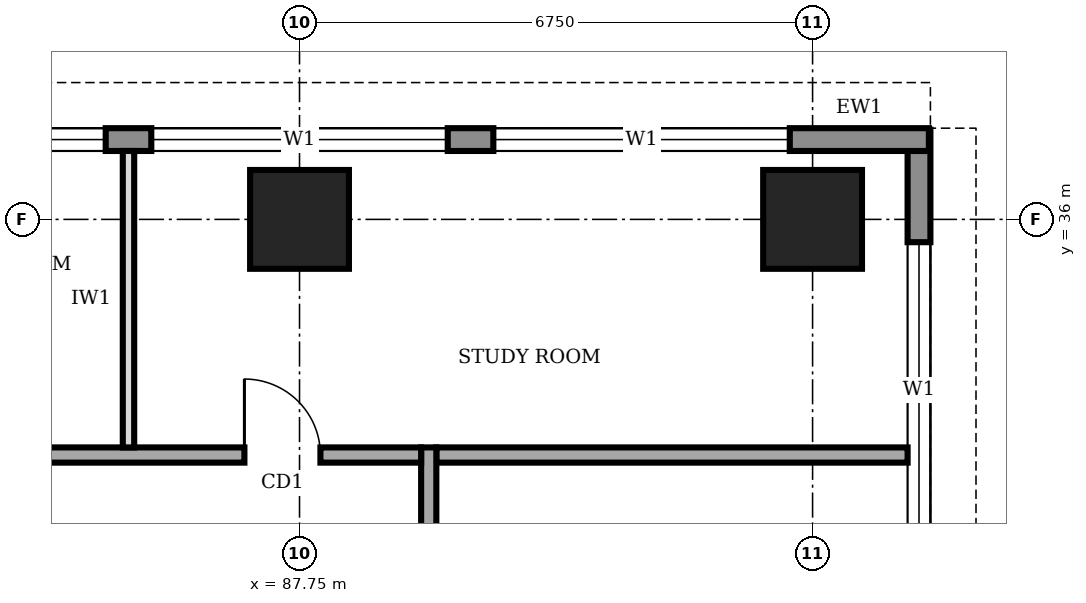
"""IFC4 building model, lengths in metres.
Left out: names, types, materials, properties, quantities, classifications, styles, units other than length and angle.
Written with IfcOpenShell. Run it as: python <this file> out.ifc"""

import sys

from ifc_helpers import new_model, si_unit, direction, frame, frame_2d, origin, origin_2d, place, context, subcontext, project, spatial, rectangle, extrude, element, fill, save


model = new_model("IFC4")
c1 = context("Model", 3, precision=1e-05, world=origin(), true_north=direction((0.0, 1.0)))
c2 = subcontext(c1, "Body", "Model", "MODEL_VIEW")
j1 = project(units=[si_unit("LENGTHUNIT", "METRE"), si_unit("PLANEANGLEUNIT", "RADIAN")], contexts=[c1])
p1 = place(None, origin())
s1 = spatial("IfcSite", under=j1, at=p1, CompositionType="ELEMENT")
p2 = place(p1, origin())
s2 = spatial("IfcBuilding", under=s1, at=p2, CompositionType="ELEMENT")
p3 = place(p2, frame((0.0, 0.0, 217.0)))
s3 = spatial("IfcBuildingStorey", under=s2, at=p3, CompositionType="ELEMENT", Elevation=217.0)
for number, where, z_axis, x_axis in (
    (1, (87.75, 36.0, 0.0), (0.0, 0.0, 1.0), (1.0, 0.0, 0.0)),
    (2, (94.5, 36.0, 0.0), (0.0, 0.0, 1.0), (1.0, 0.0, 0.0)),
):
    element("IfcColumn", number, at=place(p3, frame(where, z_axis=z_axis, x_axis=x_axis)), inside=s3, PredefinedType="COLUMN", context=c2, shape_type="SweptSolid", body=[
        extrude(rectangle(XDim=1.3, YDim=1.3, at=origin_2d()), origin(), (0.0, 0.0, 1.0), 4.0),
    ])
p4 = place(p3, frame((95.9, 3.32, 0.0), z_axis=(0.0, 0.0, 1.0), x_axis=(0.0, 1.0, 0.0)))
e3 = element("IfcWall", 3, at=p4, inside=s3, PredefinedType="STANDARD", context=c2, shape_type="SweptSolid", body=[
    extrude(rectangle(XDim=33.86, YDim=0.3, at=frame_2d((16.93, 0.0))), origin(), (0.0, 0.0, 1.0), 3.75),
])
p5 = place(p4, frame((1.48, 0.0, 0.9)))
e4 = element("IfcOpeningElement", 4, at=p5, cuts=e3, PredefinedType="OPENING", context=c2, shape_type="SweptSolid", body=[
    extrude(rectangle(XDim=3.9, YDim=2.2, at=frame_2d((1.95, 1.1))), frame((0.0, 0.16, 0.0), z_axis=(0.0, -1.0, 0.0), x_axis=(1.0, 0.0, 0.0)), (0.0, 0.0, 1.0), 0.32),
])
p6 = place(p4, frame((5.98, 0.0, 0.9)))
e5 = element("IfcOpeningElement", 5, at=p6, cuts=e3, PredefinedType="OPENING", context=c2, shape_type="SweptSolid", body=[
    extrude(rectangle(XDim=3.9, YDim=2.2, at=frame_2d((1.95, 1.1))), frame((0.0, 0.16, 0.0), z_axis=(0.0, -1.0, 0.0), x_axis=(1.0, 0.0, 0.0)), (0.0, 0.0, 1.0), 0.32),
])
p7 = place(p4, frame((10.48, 0.0, 0.9)))
e6 = element("IfcOpeningElement", 6, at=p7, cuts=e3, PredefinedType="OPENING", context=c2, shape_type="SweptSolid", body=[
    extrude(rectangle(XDim=3.9, YDim=2.2, at=frame_2d((1.95, 1.1))), frame((0.0, 0.16, 0.0), z_axis=(0.0, -1.0, 0.0), x_axis=(1.0, 0.0, 0.0)), (0.0, 0.0, 1.0), 0.32),
])
p8 = place(p4, frame((14.98, 0.0, 0.9)))
e7 = element("IfcOpeningElement", 7, at=p8, cuts=e3, PredefinedType="OPENING", context=c2, shape_type="SweptSolid", body=[
    extrude(rectangle(XDim=3.9, YDim=2.2, at=frame_2d((1.95, 1.1))), frame((0.0, 0.16, 0.0), z_axis=(0.0, -1.0, 0.0), x_axis=(1.0, 0.0, 0.0)), (0.0, 0.0, 1.0), 0.32),
])
p9 = place(p4, frame((19.48, 0.0, 0.9)))
e8 = element("IfcOpeningElement", 8, at=p9, cuts=e3, PredefinedType="OPENING", context=c2, shape_type="SweptSolid", body=[
    extrude(rectangle(XDim=3.9, YDim=2.2, at=frame_2d((1.95, 1.1))), frame((0.0, 0.16, 0.0), z_axis=(0.0, -1.0, 0.0), x_axis=(1.0, 0.0, 0.0)), (0.0, 0.0, 1.0), 0.32),
])
p10 = place(p4, frame((23.98, 0.0, 0.9)))
e9 = element("IfcOpeningElement", 9, at=p10, cuts=e3, PredefinedType="OPENING", context=c2, shape_type="SweptSolid", body=[
    extrude(rectangle(XDim=3.9, YDim=2.2, at=frame_2d((1.95, 1.1))), frame((0.0, 0.16, 0.0), z_axis=(0.0, -1.0, 0.0), x_axis=(1.0, 0.0, 0.0)), (0.0, 0.0, 1.0), 0.32),
])
p11 = place(p4, frame((28.48, 0.0, 0.9)))
e10 = element("IfcOpeningElement", 10, at=p11, cuts=e3, PredefinedType="OPENING", context=c2, shape_type="SweptSolid", body=[
    extrude(rectangle(XDim=3.9, YDim=2.2, at=frame_2d((1.95, 1.1))), frame((0.0, 0.16, 0.0), z_axis=(0.0, -1.0, 0.0), x_axis=(1.0, 0.0, 0.0)), (0.0, 0.0, 1.0), 0.32),
])
p12 = place(p3, frame((96.03, 37.05, 0.0), z_axis=(0.0, 0.0, 1.0), x_axis=(-1.0, 0.0, 0.0)))
e11 = element("IfcWall", 11, at=p12, inside=s3, PredefinedType="STANDARD", context=c2, shape_type="SweptSolid", body=[
    extrude(rectangle(XDim=29.91, YDim=0.3, at=frame_2d((14.955, 0.0))), origin(), (0.0, 0.0, 1.0), 3.75),
])
p13 = place(p12, frame((24.33, 0.0, 0.9)))
e12 = element("IfcOpeningElement", 12, at=p13, cuts=e11, PredefinedType="OPENING", context=c2, shape_type="SweptSolid", body=[
    extrude(rectangle(XDim=3.9, YDim=2.2, at=frame_2d((1.95, 1.1))), frame((0.0, 0.16, 0.0), z_axis=(0.0, -1.0, 0.0), x_axis=(1.0, 0.0, 0.0)), (0.0, 0.0, 1.0), 0.32),
])
p14 = place(p12, frame((19.83, 0.0, 0.9)))
e13 = element("IfcOpeningElement", 13, at=p14, cuts=e11, PredefinedType="OPENING", context=c2, shape_type="SweptSolid", body=[
    extrude(rectangle(XDim=3.9, YDim=2.2, at=frame_2d((1.95, 1.1))), frame((0.0, 0.16, 0.0), z_axis=(0.0, -1.0, 0.0), x_axis=(1.0, 0.0, 0.0)), (0.0, 0.0, 1.0), 0.32),
])
p15 = place(p12, frame((15.33, 0.0, 0.9)))
e14 = element("IfcOpeningElement", 14, at=p15, cuts=e11, PredefinedType="OPENING", context=c2, shape_type="SweptSolid", body=[
    extrude(rectangle(XDim=3.9, YDim=2.2, at=frame_2d((1.95, 1.1))), frame((0.0, 0.16, 0.0), z_axis=(0.0, -1.0, 0.0), x_axis=(1.0, 0.0, 0.0)), (0.0, 0.0, 1.0), 0.32),
])
p16 = place(p12, frame((10.83, 0.0, 0.9)))
e15 = element("IfcOpeningElement", 15, at=p16, cuts=e11, PredefinedType="OPENING", context=c2, shape_type="SweptSolid", body=[
    extrude(rectangle(XDim=3.9, YDim=2.2, at=frame_2d((1.95, 1.1))), frame((0.0, 0.16, 0.0), z_axis=(0.0, -1.0, 0.0), x_axis=(1.0, 0.0, 0.0)), (0.0, 0.0, 1.0), 0.32),
])
p17 = place(p12, frame((6.33, 0.0, 0.9)))
e16 = element("IfcOpeningElement", 16, at=p17, cuts=e11, PredefinedType="OPENING", context=c2, shape_type="SweptSolid", body=[
    extrude(rectangle(XDim=3.9, YDim=2.2, at=frame_2d((1.95, 1.1))), frame((0.0, 0.16, 0.0), z_axis=(0.0, -1.0, 0.0), x_axis=(1.0, 0.0, 0.0)), (0.0, 0.0, 1.0), 0.32),
])
p18 = place(p12, frame((1.83, 0.0, 0.9)))
e17 = element("IfcOpeningElement", 17, at=p18, cuts=e11, PredefinedType="OPENING", context=c2, shape_type="SweptSolid", body=[
    extrude(rectangle(XDim=3.9, YDim=2.2, at=frame_2d((1.95, 1.1))), frame((0.0, 0.16, 0.0), z_axis=(0.0, -1.0, 0.0), x_axis=(1.0, 0.0, 0.0)), (0.0, 0.0, 1.0), 0.32),
])
p19 = place(p3, frame((89.45, 9.2, 0.0), z_axis=(0.0, 0.0, 1.0), x_axis=(0.0, 1.0, 0.0)))
e18 = element("IfcWall", 18, at=p19, inside=s3, PredefinedType="SOLIDWALL", context=c2, shape_type="SweptSolid", body=[
    extrude(rectangle(XDim=23.8, YDim=0.2, at=frame_2d((11.9, 0.0))), origin(), (0.0, 0.0, 1.0), 3.75),
])
p20 = place(p19, frame((1.55, 0.0, 0.0)))
e19 = element("IfcOpeningElement", 19, at=p20, cuts=e18, PredefinedType="OPENING", context=c2, shape_type="SweptSolid", body=[
    extrude(rectangle(XDim=1.0, YDim=2.1, at=frame_2d((0.5, 1.05))), frame((0.0, 0.11, 0.0), z_axis=(0.0, -1.0, 0.0), x_axis=(1.0, 0.0, 0.0)), (0.0, 0.0, 1.0), 0.22),
])
p21 = place(p19, frame((4.9, 0.0, 0.0)))
e20 = element("IfcOpeningElement", 20, at=p21, cuts=e18, PredefinedType="OPENING", context=c2, shape_type="SweptSolid", body=[
    extrude(rectangle(XDim=1.0, YDim=2.1, at=frame_2d((0.5, 1.05))), frame((0.0, 0.11, 0.0), z_axis=(0.0, -1.0, 0.0), x_axis=(1.0, 0.0, 0.0)), (0.0, 0.0, 1.0), 0.22),
])
p22 = place(p19, frame((8.0, 0.0, 0.0)))
e21 = element("IfcOpeningElement", 21, at=p22, cuts=e18, PredefinedType="OPENING", context=c2, shape_type="SweptSolid", body=[
    extrude(rectangle(XDim=0.9, YDim=2.1, at=frame_2d((0.45, 1.05))), frame((0.0, 0.11, 0.0), z_axis=(0.0, -1.0, 0.0), x_axis=(1.0, 0.0, 0.0)), (0.0, 0.0, 1.0), 0.22),
])
p23 = place(p19, frame((11.05, 0.0, 0.0)))
e22 = element("IfcOpeningElement", 22, at=p23, cuts=e18, PredefinedType="OPENING", context=c2, shape_type="SweptSolid", body=[
    extrude(rectangle(XDim=0.9, YDim=2.1, at=frame_2d((0.45, 1.05))), frame((0.0, 0.11, 0.0), z_axis=(0.0, -1.0, 0.0), x_axis=(1.0, 0.0, 0.0)), (0.0, 0.0, 1.0), 0.22),
])
p24 = place(p19, frame((15.75, 0.0, 0.0)))
e23 = element("IfcOpeningElement", 23, at=p24, cuts=e18, PredefinedType="OPENING", context=c2, shape_type="SweptSolid", body=[
    extrude(rectangle(XDim=0.9, YDim=2.1, at=frame_2d((0.45, 1.05))), frame((0.0, 0.11, 0.0), z_axis=(0.0, -1.0, 0.0), x_axis=(1.0, 0.0, 0.0)), (0.0, 0.0, 1.0), 0.22),
])
p25 = place(p19, frame((13.1, 0.0, 0.0)))
e24 = element("IfcOpeningElement", 24, at=p25, cuts=e18, PredefinedType="OPENING", context=c2, shape_type="SweptSolid", body=[
    extrude(rectangle(XDim=1.0, YDim=2.1, at=frame_2d((0.5, 1.05))), frame((0.0, 0.11, 0.0), z_axis=(0.0, -1.0, 0.0), x_axis=(1.0, 0.0, 0.0)), (0.0, 0.0, 1.0), 0.22),
])
p26 = place(p19, frame((20.3, 0.0, 0.0)))
e25 = element("IfcOpeningElement", 25, at=p26, cuts=e18, PredefinedType="OPENING", context=c2, shape_type="SweptSolid", body=[
    extrude(rectangle(XDim=1.0, YDim=2.1, at=frame_2d((0.5, 1.05))), frame((0.0, 0.11, 0.0), z_axis=(0.0, -1.0, 0.0), x_axis=(1.0, 0.0, 0.0)), (0.0, 0.0, 1.0), 0.22),
])
p27 = place(p3, frame((89.35, 32.9, 0.0), z_axis=(0.0, 0.0, 1.0), x_axis=(-1.0, 0.0, 0.0)))
e26 = element("IfcWall", 26, at=p27, inside=s3, PredefinedType="SOLIDWALL", context=c2, shape_type="SweptSolid", body=[
    extrude(rectangle(XDim=16.9, YDim=0.2, at=frame_2d((8.45, 0.0))), origin(), (0.0, 0.0, 1.0), 3.75),
])
p28 = place(p27, frame((14.375, 0.0, 0.0)))
e27 = element("IfcOpeningElement", 27, at=p28, cuts=e26, PredefinedType="OPENING", context=c2, shape_type="SweptSolid", body=[
    extrude(rectangle(XDim=1.0, YDim=2.1, at=frame_2d((0.5, 1.05))), frame((0.0, 0.11, 0.0), z_axis=(0.0, -1.0, 0.0), x_axis=(1.0, 0.0, 0.0)), (0.0, 0.0, 1.0), 0.22),
])
p29 = place(p27, frame((1.325, 0.0, 0.0)))
e28 = element("IfcOpeningElement", 28, at=p29, cuts=e26, PredefinedType="OPENING", context=c2, shape_type="SweptSolid", body=[
    extrude(rectangle(XDim=1.0, YDim=2.1, at=frame_2d((0.5, 1.05))), frame((0.0, 0.11, 0.0), z_axis=(0.0, -1.0, 0.0), x_axis=(1.0, 0.0, 0.0)), (0.0, 0.0, 1.0), 0.22),
])
p30 = place(p3, frame((89.55, 32.9, 0.0), z_axis=(0.0, 0.0, 1.0), x_axis=(1.0, 0.0, 0.0)))
e29 = element("IfcWall", 29, at=p30, inside=s3, PredefinedType="SOLIDWALL", context=c2, shape_type="SweptSolid", body=[
    extrude(rectangle(XDim=6.2, YDim=0.2, at=frame_2d((3.1, 0.0))), origin(), (0.0, 0.0, 1.0), 3.75),
])
p31 = place(p3, frame((85.5, 33.0, 0.0), z_axis=(0.0, 0.0, 1.0), x_axis=(0.0, 1.0, 0.0)))
e30 = element("IfcWall", 30, at=p31, inside=s3, PredefinedType="PARTITIONING", context=c2, shape_type="SweptSolid", body=[
    extrude(rectangle(XDim=3.9, YDim=0.15, at=frame_2d((1.95, 0.0))), origin(), (0.0, 0.0, 1.0), 3.75),
])
p32 = place(p11, origin())
e31 = element("IfcWindow", 31, at=p32, inside=s3, PartitioningType="SINGLE_PANEL", PredefinedType="WINDOW", context=c2, shape_type="SweptSolid", body=[
    extrude(rectangle(XDim=3.9, YDim=2.2, at=frame_2d((1.95, 1.1))), frame((0.0, 0.03, 0.0), z_axis=(0.0, -1.0, 0.0), x_axis=(1.0, 0.0, 0.0)), (0.0, 0.0, 1.0), 0.06),
])
fill(e10, e31)
p33 = place(p16, origin())
e32 = element("IfcWindow", 32, at=p33, inside=s3, PartitioningType="SINGLE_PANEL", PredefinedType="WINDOW", context=c2, shape_type="SweptSolid", body=[
    extrude(rectangle(XDim=3.9, YDim=2.2, at=frame_2d((1.95, 1.1))), frame((0.0, 0.03, 0.0), z_axis=(0.0, -1.0, 0.0), x_axis=(1.0, 0.0, 0.0)), (0.0, 0.0, 1.0), 0.06),
])
fill(e15, e32)
p34 = place(p17, origin())
e33 = element("IfcWindow", 33, at=p34, inside=s3, PartitioningType="SINGLE_PANEL", PredefinedType="WINDOW", context=c2, shape_type="SweptSolid", body=[
    extrude(rectangle(XDim=3.9, YDim=2.2, at=frame_2d((1.95, 1.1))), frame((0.0, 0.03, 0.0), z_axis=(0.0, -1.0, 0.0), x_axis=(1.0, 0.0, 0.0)), (0.0, 0.0, 1.0), 0.06),
])
fill(e16, e33)
p35 = place(p18, origin())
e34 = element("IfcWindow", 34, at=p35, inside=s3, PartitioningType="SINGLE_PANEL", PredefinedType="WINDOW", context=c2, shape_type="SweptSolid", body=[
    extrude(rectangle(XDim=3.9, YDim=2.2, at=frame_2d((1.95, 1.1))), frame((0.0, 0.03, 0.0), z_axis=(0.0, -1.0, 0.0), x_axis=(1.0, 0.0, 0.0)), (0.0, 0.0, 1.0), 0.06),
])
fill(e17, e34)
p36 = place(p29, frame((1.0, 0.0, 0.0), z_axis=(0.0, 0.0, 1.0), x_axis=(-1.0, 0.0, 0.0)))
e35 = element("IfcDoor", 35, at=p36, inside=s3, OperationType="SINGLE_SWING_LEFT", PredefinedType="DOOR", context=c2, shape_type="SweptSolid", body=[
    extrude(rectangle(XDim=1.0, YDim=2.1, at=frame_2d((0.5, 1.05))), frame((0.0, 0.025, 0.0), z_axis=(0.0, -1.0, 0.0), x_axis=(1.0, 0.0, 0.0)), (0.0, 0.0, 1.0), 0.05),
])
fill(e28, e35)
save(model, sys.argv[1])
